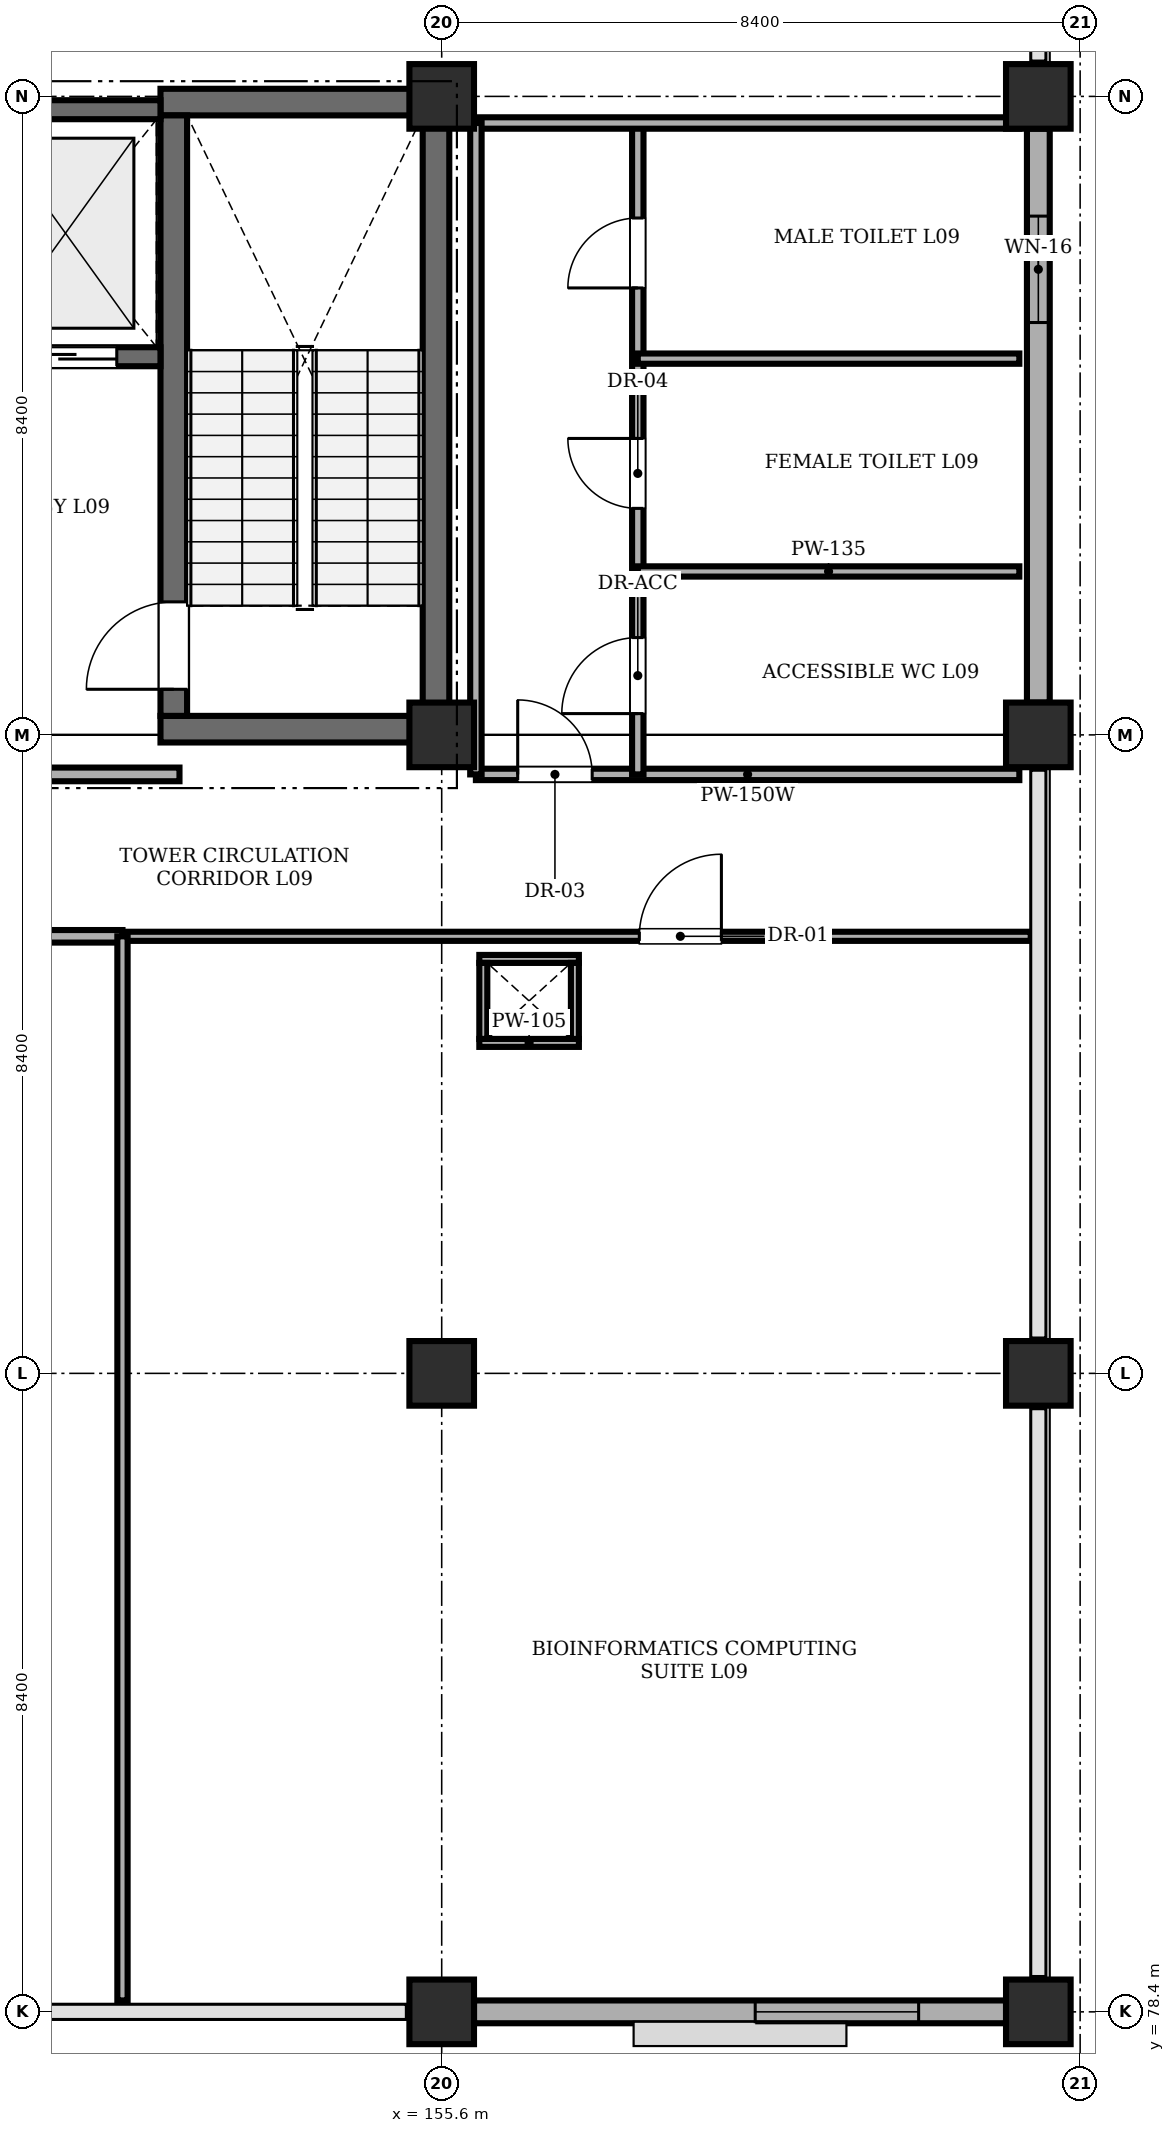
"""IFC4 building model, lengths in metres.
Left out: names, types, materials, properties, quantities, classifications, styles, units other than length and angle.
Written with IfcOpenShell. Run it as: python <this file> out.ifc"""

import sys

from ifc_helpers import new_model, si_unit, direction, frame, frame_2d, origin, origin_2d, place, context, subcontext, project, spatial, rectangle, extrude, element, fill, save


model = new_model("IFC4")
c1 = context("Model", 3, precision=1e-05, world=origin(), true_north=direction((0.0, 1.0)))
c2 = subcontext(c1, "Body", "Model", "MODEL_VIEW")
j1 = project(units=[si_unit("LENGTHUNIT", "METRE"), si_unit("PLANEANGLEUNIT", "RADIAN")], contexts=[c1])
p1 = place(None, origin())
s1 = spatial("IfcSite", under=j1, at=p1, CompositionType="ELEMENT")
p2 = place(p1, origin())
s2 = spatial("IfcBuilding", under=s1, at=p2, CompositionType="ELEMENT")
p3 = place(p2, frame((0.0, 0.0, 36.0)))
s3 = spatial("IfcBuildingStorey", under=s2, at=p3, CompositionType="ELEMENT", Elevation=36.0)
for number, where, z_axis, x_axis in (
    (1, (155.6, 78.4, 0.0), (0.0, 0.0, 1.0), (1.0, 0.0, 0.0)),
    (2, (155.6, 86.8, 0.0), (0.0, 0.0, 1.0), (1.0, 0.0, 0.0)),
    (3, (155.6, 95.2, 0.0), (0.0, 0.0, 1.0), (1.0, 0.0, 0.0)),
    (4, (155.6, 103.6, 0.0), (0.0, 0.0, 1.0), (1.0, 0.0, 0.0)),
    (5, (163.45, 78.4, 0.0), (0.0, 0.0, 1.0), (1.0, 0.0, 0.0)),
    (6, (163.45, 86.8, 0.0), (0.0, 0.0, 1.0), (1.0, 0.0, 0.0)),
    (7, (163.45, 95.2, 0.0), (0.0, 0.0, 1.0), (1.0, 0.0, 0.0)),
    (8, (163.45, 103.6, 0.0), (0.0, 0.0, 1.0), (1.0, 0.0, 0.0)),
):
    element("IfcColumn", number, at=place(p3, frame(where, z_axis=z_axis, x_axis=x_axis)), inside=s3, PredefinedType="COLUMN", context=c2, shape_type="SweptSolid", body=[
        extrude(rectangle(XDim=0.85, YDim=0.85, at=origin_2d()), origin(), (0.0, 0.0, 1.0), 4.02),
    ])
for number, where, z_axis, x_axis in (
    (9, (151.9, 95.275, 0.0), (0.0, 0.0, 1.0), (1.0, 0.0, 0.0)),
    (10, (151.9, 103.525, 0.0), (0.0, 0.0, 1.0), (1.0, 0.0, 0.0)),
):
    element("IfcWall", number, at=place(p3, frame(where, z_axis=z_axis, x_axis=x_axis)), inside=s3, PredefinedType="SHEAR", context=c2, shape_type="SweptSolid", body=[
        extrude(rectangle(XDim=3.8, YDim=0.35, at=frame_2d((1.9, 0.0))), origin(), (0.0, 0.0, 1.0), 4.02),
    ])
p4 = place(p3, frame((152.075, 95.45, 0.0), z_axis=(0.0, 0.0, 1.0), x_axis=(0.0, 1.0, 0.0)))
e11 = element("IfcWall", 11, at=p4, inside=s3, PredefinedType="SHEAR", context=c2, shape_type="SweptSolid", body=[
    extrude(rectangle(XDim=7.9, YDim=0.35, at=frame_2d((3.95, 0.0))), origin(), (0.0, 0.0, 1.0), 4.02),
])
p5 = place(p4, frame((0.35, 0.0, 0.0)))
e12 = element("IfcOpeningElement", 12, at=p5, cuts=e11, PredefinedType="OPENING", context=c2, shape_type="SweptSolid", body=[
    extrude(rectangle(XDim=1.15, YDim=2.15, at=frame_2d((0.575, 1.075))), frame((0.0, 0.185, 0.0), z_axis=(0.0, -1.0, 0.0), x_axis=(1.0, 0.0, 0.0)), (0.0, 0.0, 1.0), 0.37),
])
p6 = place(p3, frame((155.525, 95.45, 0.0), z_axis=(0.0, 0.0, 1.0), x_axis=(0.0, 1.0, 0.0)))
e13 = element("IfcWall", 13, at=p6, inside=s3, PredefinedType="SHEAR", context=c2, shape_type="SweptSolid", body=[
    extrude(rectangle(XDim=7.9, YDim=0.35, at=frame_2d((3.95, 0.0))), origin(), (0.0, 0.0, 1.0), 4.02),
])
p7 = place(p3, frame((149.45, 100.175, 0.0), z_axis=(0.0, 0.0, 1.0), x_axis=(1.0, 0.0, 0.0)))
e14 = element("IfcWall", 14, at=p7, inside=s3, PredefinedType="SHEAR", context=c2, shape_type="SweptSolid", body=[
    extrude(rectangle(XDim=2.45, YDim=0.25, at=frame_2d((1.225, 0.0))), origin(), (0.0, 0.0, 1.0), 4.02),
])
p8 = place(p7, frame((0.575, 0.0, 0.0)))
e15 = element("IfcOpeningElement", 15, at=p8, cuts=e14, PredefinedType="OPENING", context=c2, shape_type="SweptSolid", body=[
    extrude(rectangle(XDim=1.3, YDim=2.25, at=frame_2d((0.65, 1.125))), frame((0.0, 0.135, 0.0), z_axis=(0.0, -1.0, 0.0), x_axis=(1.0, 0.0, 0.0)), (0.0, 0.0, 1.0), 0.27),
])
p9 = place(p3, frame((149.45, 103.425, 0.0), z_axis=(0.0, 0.0, 1.0), x_axis=(1.0, 0.0, 0.0)))
e16 = element("IfcWall", 16, at=p9, inside=s3, PredefinedType="SHEAR", context=c2, shape_type="SweptSolid", body=[
    extrude(rectangle(XDim=2.45, YDim=0.25, at=frame_2d((1.225, 0.0))), origin(), (0.0, 0.0, 1.0), 4.02),
])
p10 = place(p3, frame((163.025, 78.4, 0.0), z_axis=(0.0, 0.0, 1.0), x_axis=(-1.0, 0.0, 0.0)))
e17 = element("IfcWall", 17, at=p10, inside=s3, PredefinedType="STANDARD", context=c2, shape_type="SweptSolid", body=[
    extrude(rectangle(XDim=7.0, YDim=0.3, at=frame_2d((3.5, 0.0))), origin(), (0.0, 0.0, 1.0), 3.32),
])
p11 = place(p10, frame((1.15, 0.0, 0.95)))
e18 = element("IfcOpeningElement", 18, at=p11, cuts=e17, PredefinedType="OPENING", context=c2, shape_type="SweptSolid", body=[
    extrude(rectangle(XDim=2.15, YDim=1.95, at=frame_2d((1.075, 0.975))), frame((0.0, 0.16, 0.0), z_axis=(0.0, -1.0, 0.0), x_axis=(1.0, 0.0, 0.0)), (0.0, 0.0, 1.0), 0.32),
])
p12 = place(p3, frame((163.45, 103.175, 0.0), z_axis=(0.0, 0.0, 1.0), x_axis=(0.0, -1.0, 0.0)))
e19 = element("IfcWall", 19, at=p12, inside=s3, PredefinedType="STANDARD", context=c2, shape_type="SweptSolid", body=[
    extrude(rectangle(XDim=7.55, YDim=0.3, at=frame_2d((3.775, 0.0))), origin(), (0.0, 0.0, 1.0), 3.32),
])
p13 = place(p12, frame((1.15, 0.0, 1.1)))
e20 = element("IfcOpeningElement", 20, at=p13, cuts=e19, PredefinedType="OPENING", context=c2, shape_type="SweptSolid", body=[
    extrude(rectangle(XDim=1.4, YDim=1.4, at=frame_2d((0.7, 0.7))), frame((0.0, 0.16, 0.0), z_axis=(0.0, -1.0, 0.0), x_axis=(1.0, 0.0, 0.0)), (0.0, 0.0, 1.0), 0.32),
])
p14 = place(p3, frame((147.3, 94.68, 0.0), z_axis=(0.0, 0.0, 1.0), x_axis=(1.0, 0.0, 0.0)))
e21 = element("IfcWall", 21, at=p14, inside=s3, PredefinedType="STANDARD", context=c2, shape_type="SweptSolid", body=[
    extrude(rectangle(XDim=4.85, YDim=0.18, at=frame_2d((2.425, 0.0))), origin(), (0.0, 0.0, 1.0), 4.02),
])
p15 = place(p14, frame((1.6, 0.0, 0.0)))
e22 = element("IfcOpeningElement", 22, at=p15, cuts=e21, PredefinedType="OPENING", context=c2, shape_type="SweptSolid", body=[
    extrude(rectangle(XDim=1.15, YDim=2.15, at=frame_2d((0.575, 1.075))), frame((0.0, 0.1, 0.0), z_axis=(0.0, -1.0, 0.0), x_axis=(1.0, 0.0, 0.0)), (0.0, 0.0, 1.0), 0.2),
])
p16 = place(p3, frame((156.05, 94.68, 0.0), z_axis=(0.0, 0.0, 1.0), x_axis=(1.0, 0.0, 0.0)))
e23 = element("IfcWall", 23, at=p16, inside=s3, PredefinedType="PARTITIONING", context=c2, shape_type="SweptSolid", body=[
    extrude(rectangle(XDim=7.15, YDim=0.15, at=frame_2d((3.575, 0.0))), origin(), (0.0, 0.0, 1.0), 4.02),
])
p17 = place(p16, frame((0.55, 0.0, 0.0)))
e24 = element("IfcOpeningElement", 24, at=p17, cuts=e23, PredefinedType="OPENING", context=c2, shape_type="SweptSolid", body=[
    extrude(rectangle(XDim=0.98, YDim=2.12, at=frame_2d((0.49, 1.06))), frame((0.0, 0.085, 0.0), z_axis=(0.0, -1.0, 0.0), x_axis=(1.0, 0.0, 0.0)), (0.0, 0.0, 1.0), 0.17),
])
p18 = place(p3, frame((158.18, 94.68, 0.0), z_axis=(0.0, 0.0, 1.0), x_axis=(0.0, 1.0, 0.0)))
e25 = element("IfcWall", 25, at=p18, inside=s3, PredefinedType="PARTITIONING", context=c2, shape_type="SweptSolid", body=[
    extrude(rectangle(XDim=8.57, YDim=0.15, at=frame_2d((4.285, 0.0))), origin(), (0.0, 0.0, 1.0), 4.02),
])
p19 = place(p18, frame((0.8, 0.0, 0.0)))
e26 = element("IfcOpeningElement", 26, at=p19, cuts=e25, PredefinedType="OPENING", context=c2, shape_type="SweptSolid", body=[
    extrude(rectangle(XDim=1.0, YDim=2.12, at=frame_2d((0.5, 1.06))), frame((0.0, 0.085, 0.0), z_axis=(0.0, -1.0, 0.0), x_axis=(1.0, 0.0, 0.0)), (0.0, 0.0, 1.0), 0.17),
])
p20 = place(p18, frame((3.5, 0.0, 0.0)))
e27 = element("IfcOpeningElement", 27, at=p20, cuts=e25, PredefinedType="OPENING", context=c2, shape_type="SweptSolid", body=[
    extrude(rectangle(XDim=0.92, YDim=2.1, at=frame_2d((0.46, 1.05))), frame((0.0, 0.085, 0.0), z_axis=(0.0, -1.0, 0.0), x_axis=(1.0, 0.0, 0.0)), (0.0, 0.0, 1.0), 0.17),
])
p21 = place(p18, frame((6.4, 0.0, 0.0)))
e28 = element("IfcOpeningElement", 28, at=p21, cuts=e25, PredefinedType="OPENING", context=c2, shape_type="SweptSolid", body=[
    extrude(rectangle(XDim=0.92, YDim=2.1, at=frame_2d((0.46, 1.05))), frame((0.0, 0.085, 0.0), z_axis=(0.0, -1.0, 0.0), x_axis=(1.0, 0.0, 0.0)), (0.0, 0.0, 1.0), 0.17),
])
for number, where, z_axis, x_axis in (
    (29, (158.18, 97.35, 0.0), (0.0, 0.0, 1.0), (1.0, 0.0, 0.0)),
    (30, (158.18, 100.15, 0.0), (0.0, 0.0, 1.0), (1.0, 0.0, 0.0)),
):
    element("IfcWall", number, at=place(p3, frame(where, z_axis=z_axis, x_axis=x_axis)), inside=s3, PredefinedType="PARTITIONING", context=c2, shape_type="SweptSolid", body=[
        extrude(rectangle(XDim=5.02, YDim=0.135, at=frame_2d((2.51, 0.0))), origin(), (0.0, 0.0, 1.0), 4.02),
    ])
p22 = place(p3, frame((156.05, 103.25, 0.0), z_axis=(0.0, 0.0, 1.0), x_axis=(1.0, 0.0, 0.0)))
e31 = element("IfcWall", 31, at=p22, inside=s3, PredefinedType="PARTITIONING", context=c2, shape_type="SweptSolid", body=[
    extrude(rectangle(XDim=7.15, YDim=0.15, at=frame_2d((3.575, 0.0))), origin(), (0.0, 0.0, 1.0), 4.02),
])
p23 = place(p3, frame((156.05, 94.68, 0.0), z_axis=(0.0, 0.0, 1.0), x_axis=(0.0, 1.0, 0.0)))
e32 = element("IfcWall", 32, at=p23, inside=s3, PredefinedType="PARTITIONING", context=c2, shape_type="SweptSolid", body=[
    extrude(rectangle(XDim=8.57, YDim=0.15, at=frame_2d((4.285, 0.0))), origin(), (0.0, 0.0, 1.0), 4.02),
])
p24 = place(p3, frame((138.8, 92.55, 0.0), z_axis=(0.0, 0.0, 1.0), x_axis=(1.0, 0.0, 0.0)))
e33 = element("IfcWall", 33, at=p24, inside=s3, PredefinedType="PARTITIONING", context=c2, shape_type="SweptSolid", body=[
    extrude(rectangle(XDim=12.6, YDim=0.165, at=frame_2d((6.3, 0.0))), origin(), (0.0, 0.0, 1.0), 4.02),
])
p25 = place(p24, frame((3.4, 0.0, 0.0)))
e34 = element("IfcOpeningElement", 34, at=p25, cuts=e33, PredefinedType="OPENING", context=c2, shape_type="SweptSolid", body=[
    extrude(rectangle(XDim=1.22, YDim=2.2, at=frame_2d((0.61, 1.1))), frame((0.0, 0.093, 0.0), z_axis=(0.0, -1.0, 0.0), x_axis=(1.0, 0.0, 0.0)), (0.0, 0.0, 1.0), 0.185),
])
p26 = place(p3, frame((151.4, 92.55, 0.0), z_axis=(0.0, 0.0, 1.0), x_axis=(1.0, 0.0, 0.0)))
e35 = element("IfcWall", 35, at=p26, inside=s3, PredefinedType="PARTITIONING", context=c2, shape_type="SweptSolid", body=[
    extrude(rectangle(XDim=11.95, YDim=0.12, at=frame_2d((5.975, 0.0))), origin(), (0.0, 0.0, 1.0), 4.02),
])
p27 = place(p26, frame((6.8, 0.0, 0.0)))
e36 = element("IfcOpeningElement", 36, at=p27, cuts=e35, PredefinedType="OPENING", context=c2, shape_type="SweptSolid", body=[
    extrude(rectangle(XDim=1.08, YDim=2.15, at=frame_2d((0.54, 1.075))), frame((0.0, 0.07, 0.0), z_axis=(0.0, -1.0, 0.0), x_axis=(1.0, 0.0, 0.0)), (0.0, 0.0, 1.0), 0.14),
])
p28 = place(p3, frame((151.4, 78.55, 0.0), z_axis=(0.0, 0.0, 1.0), x_axis=(0.0, 1.0, 0.0)))
e37 = element("IfcWall", 37, at=p28, inside=s3, PredefinedType="PARTITIONING", context=c2, shape_type="SweptSolid", body=[
    extrude(rectangle(XDim=14.0, YDim=0.135, at=frame_2d((7.0, 0.0))), origin(), (0.0, 0.0, 1.0), 3.52),
])
for number, where, z_axis, x_axis in (
    (38, (156.095, 91.147, 0.0), (0.0, 0.0, 1.0), (1.0, 0.0, 0.0)),
    (39, (156.095, 92.252, 0.0), (0.0, 0.0, 1.0), (1.0, 0.0, 0.0)),
):
    element("IfcWall", number, at=place(p3, frame(where, z_axis=z_axis, x_axis=x_axis)), inside=s3, PredefinedType="PARTITIONING", context=c2, shape_type="SweptSolid", body=[
        extrude(rectangle(XDim=1.31, YDim=0.105, at=frame_2d((0.655, 0.0))), origin(), (0.0, 0.0, 1.0), 4.02),
    ])
for number, where, z_axis, x_axis in (
    (40, (156.147, 91.2, 0.0), (0.0, 0.0, 1.0), (0.0, 1.0, 0.0)),
    (41, (157.353, 91.2, 0.0), (0.0, 0.0, 1.0), (0.0, 1.0, 0.0)),
):
    element("IfcWall", number, at=place(p3, frame(where, z_axis=z_axis, x_axis=x_axis)), inside=s3, PredefinedType="PARTITIONING", context=c2, shape_type="SweptSolid", body=[
        extrude(rectangle(XDim=1.0, YDim=0.105, at=frame_2d((0.5, 0.0))), origin(), (0.0, 0.0, 1.0), 4.02),
    ])
p29 = place(p11, origin())
e42 = element("IfcWindow", 42, at=p29, inside=s3, PartitioningType="DOUBLE_PANEL_VERTICAL", PredefinedType="WINDOW", context=c2, shape_type="SweptSolid", body=[
    extrude(rectangle(XDim=2.15, YDim=1.95, at=frame_2d((1.075, 0.975))), frame((0.0, 0.03, 0.0), z_axis=(0.0, -1.0, 0.0), x_axis=(1.0, 0.0, 0.0)), (0.0, 0.0, 1.0), 0.06),
])
fill(e18, e42)
p30 = place(p13, origin())
e43 = element("IfcWindow", 43, at=p30, inside=s3, PartitioningType="SINGLE_PANEL", PredefinedType="WINDOW", context=c2, shape_type="SweptSolid", body=[
    extrude(rectangle(XDim=1.4, YDim=1.4, at=frame_2d((0.7, 0.7))), frame((0.0, 0.03, 0.0), z_axis=(0.0, -1.0, 0.0), x_axis=(1.0, 0.0, 0.0)), (0.0, 0.0, 1.0), 0.06),
])
fill(e20, e43)
p31 = place(p17, origin())
e44 = element("IfcDoor", 44, at=p31, inside=s3, OperationType="SINGLE_SWING_LEFT", PredefinedType="DOOR", context=c2, shape_type="SweptSolid", body=[
    extrude(rectangle(XDim=0.98, YDim=2.12, at=frame_2d((0.49, 1.06))), frame((0.0, 0.025, 0.0), z_axis=(0.0, -1.0, 0.0), x_axis=(1.0, 0.0, 0.0)), (0.0, 0.0, 1.0), 0.05),
])
fill(e24, e44)
p32 = place(p19, origin())
e45 = element("IfcDoor", 45, at=p32, inside=s3, OperationType="SINGLE_SWING_LEFT", PredefinedType="DOOR", context=c2, shape_type="SweptSolid", body=[
    extrude(rectangle(XDim=1.0, YDim=2.12, at=frame_2d((0.5, 1.06))), frame((0.0, 0.025, 0.0), z_axis=(0.0, -1.0, 0.0), x_axis=(1.0, 0.0, 0.0)), (0.0, 0.0, 1.0), 0.05),
])
fill(e26, e45)
p33 = place(p20, origin())
e46 = element("IfcDoor", 46, at=p33, inside=s3, OperationType="SINGLE_SWING_RIGHT", PredefinedType="DOOR", context=c2, shape_type="SweptSolid", body=[
    extrude(rectangle(XDim=0.92, YDim=2.1, at=frame_2d((0.46, 1.05))), frame((0.0, 0.025, 0.0), z_axis=(0.0, -1.0, 0.0), x_axis=(1.0, 0.0, 0.0)), (0.0, 0.0, 1.0), 0.05),
])
fill(e27, e46)
p34 = place(p21, origin())
e47 = element("IfcDoor", 47, at=p34, inside=s3, OperationType="SINGLE_SWING_LEFT", PredefinedType="DOOR", context=c2, shape_type="SweptSolid", body=[
    extrude(rectangle(XDim=0.92, YDim=2.1, at=frame_2d((0.46, 1.05))), frame((0.0, 0.025, 0.0), z_axis=(0.0, -1.0, 0.0), x_axis=(1.0, 0.0, 0.0)), (0.0, 0.0, 1.0), 0.05),
])
fill(e28, e47)
p35 = place(p27, origin())
e48 = element("IfcDoor", 48, at=p35, inside=s3, OperationType="SINGLE_SWING_RIGHT", PredefinedType="DOOR", context=c2, shape_type="SweptSolid", body=[
    extrude(rectangle(XDim=1.08, YDim=2.15, at=frame_2d((0.54, 1.075))), frame((0.0, 0.025, 0.0), z_axis=(0.0, -1.0, 0.0), x_axis=(1.0, 0.0, 0.0)), (0.0, 0.0, 1.0), 0.05),
])
fill(e36, e48)
p36 = place(p5, origin())
e49 = element("IfcDoor", 49, at=p36, inside=s3, OperationType="SINGLE_SWING_LEFT", PredefinedType="DOOR", context=c2, shape_type="SweptSolid", body=[
    extrude(rectangle(XDim=1.15, YDim=2.15, at=frame_2d((0.575, 1.075))), frame((0.0, 0.025, 0.0), z_axis=(0.0, -1.0, 0.0), x_axis=(1.0, 0.0, 0.0)), (0.0, 0.0, 1.0), 0.05),
])
fill(e12, e49)
p37 = place(p8, origin())
e50 = element("IfcDoor", 50, at=p37, inside=s3, OperationType="SLIDING_TO_LEFT", PredefinedType="DOOR", context=c2, shape_type="SweptSolid", body=[
    extrude(rectangle(XDim=1.3, YDim=2.25, at=frame_2d((0.65, 1.125))), frame((0.0, 0.025, 0.0), z_axis=(0.0, -1.0, 0.0), x_axis=(1.0, 0.0, 0.0)), (0.0, 0.0, 1.0), 0.05),
])
fill(e15, e50)
save(model, sys.argv[1])
